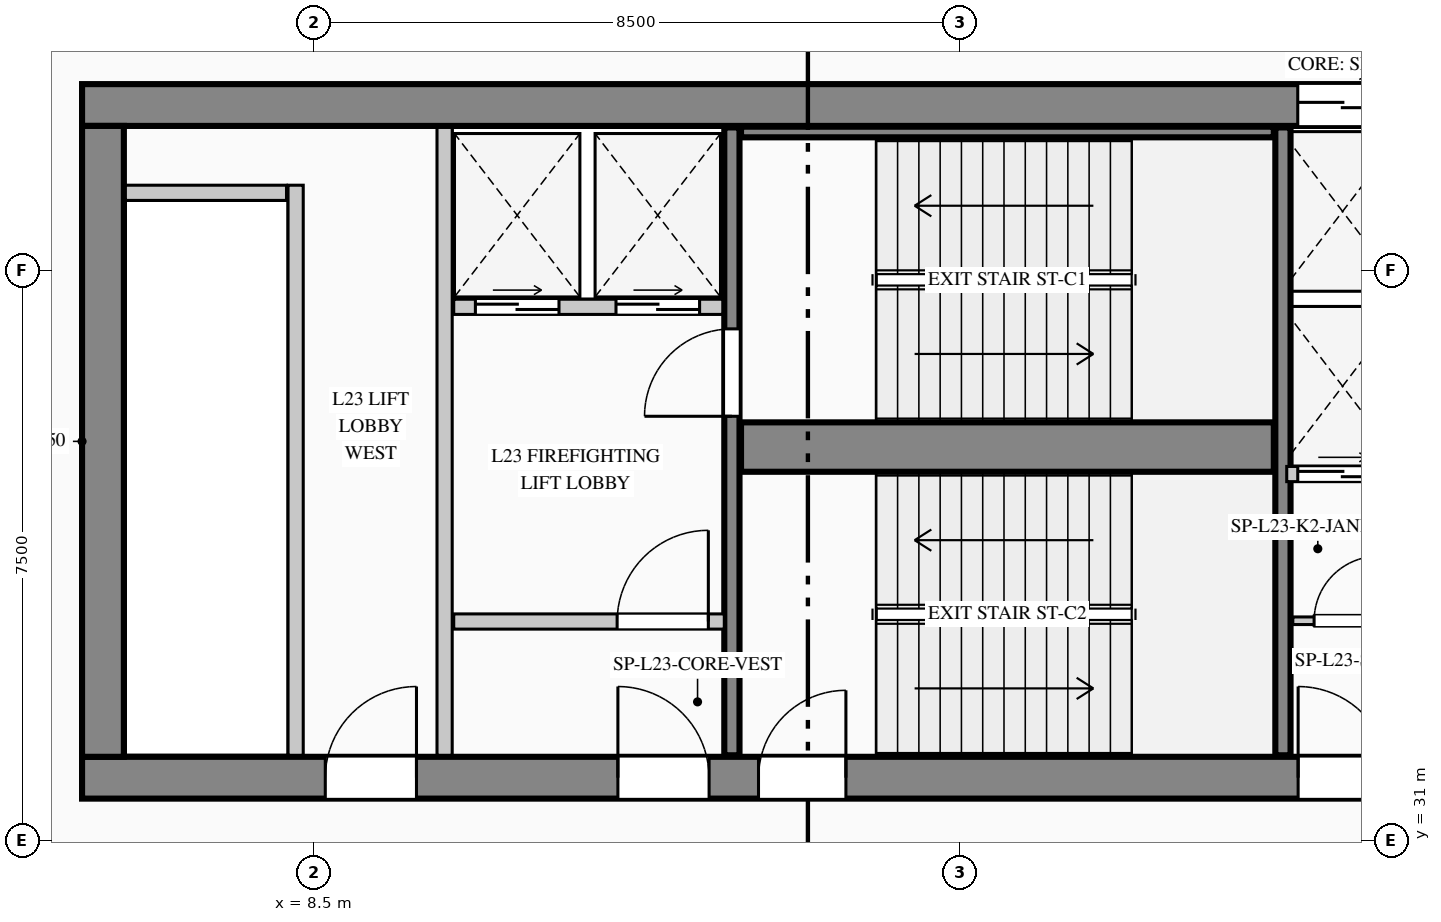
"""IFC4 building model, lengths in metres.
Left out: names, types, materials, properties, quantities, classifications, styles, units other than length and angle.
Written with IfcOpenShell. Run it as: python <this file> out.ifc"""

import sys

from ifc_helpers import new_model, si_unit, direction, frame, frame_2d, origin, place, context, subcontext, project, spatial, rectangle, extrude, element, fill, save


model = new_model("IFC4")
c1 = context("Model", 3, precision=1e-05, world=origin(), true_north=direction((0.0, 1.0)))
c2 = subcontext(c1, "Body", "Model", "MODEL_VIEW")
j1 = project(units=[si_unit("LENGTHUNIT", "METRE"), si_unit("PLANEANGLEUNIT", "RADIAN")], contexts=[c1])
p1 = place(None, origin())
s1 = spatial("IfcSite", under=j1, at=p1, CompositionType="ELEMENT")
p2 = place(p1, origin())
s2 = spatial("IfcBuilding", under=s1, at=p2, CompositionType="ELEMENT")
p3 = place(p2, frame((0.0, 0.0, 101.8)))
s3 = spatial("IfcBuildingStorey", under=s2, at=p3, CompositionType="ELEMENT", Elevation=101.8)
p4 = place(p3, frame((5.45, 40.675, 0.0), z_axis=(0.0, 0.0, 1.0), x_axis=(1.0, 0.0, 0.0)))
e1 = element("IfcWall", 1, at=p4, inside=s3, PredefinedType="SHEAR", context=c2, shape_type="SweptSolid", body=[
    extrude(rectangle(XDim=17.95, YDim=0.55, at=frame_2d((8.975, 0.0))), origin(), (0.0, 0.0, 1.0), 4.4),
])
p5 = place(p4, frame((15.995, 0.0, 0.0)))
e2 = element("IfcOpeningElement", 2, at=p5, cuts=e1, PredefinedType="OPENING", context=c2, shape_type="SweptSolid", body=[
    extrude(rectangle(XDim=1.18, YDim=2.25, at=frame_2d((0.59, 1.125))), frame((0.0, 0.285, 0.0), z_axis=(0.0, -1.0, 0.0), x_axis=(1.0, 0.0, 0.0)), (0.0, 0.0, 1.0), 0.57),
])
p6 = place(p3, frame((5.45, 31.825, 0.0), z_axis=(0.0, 0.0, 1.0), x_axis=(1.0, 0.0, 0.0)))
e3 = element("IfcWall", 3, at=p6, inside=s3, PredefinedType="SHEAR", context=c2, shape_type="SweptSolid", body=[
    extrude(rectangle(XDim=17.95, YDim=0.55, at=frame_2d((8.975, 0.0))), origin(), (0.0, 0.0, 1.0), 4.4),
])
p7 = place(p6, frame((3.2, 0.0, 0.0)))
e4 = element("IfcOpeningElement", 4, at=p7, cuts=e3, PredefinedType="OPENING", context=c2, shape_type="SweptSolid", body=[
    extrude(rectangle(XDim=1.2, YDim=2.2, at=frame_2d((0.6, 1.1))), frame((0.0, 0.285, 0.0), z_axis=(0.0, -1.0, 0.0), x_axis=(1.0, 0.0, 0.0)), (0.0, 0.0, 1.0), 0.57),
])
p8 = place(p6, frame((7.05, 0.0, 0.0)))
e5 = element("IfcOpeningElement", 5, at=p8, cuts=e3, PredefinedType="OPENING", context=c2, shape_type="SweptSolid", body=[
    extrude(rectangle(XDim=1.2, YDim=2.2, at=frame_2d((0.6, 1.1))), frame((0.0, 0.285, 0.0), z_axis=(0.0, -1.0, 0.0), x_axis=(1.0, 0.0, 0.0)), (0.0, 0.0, 1.0), 0.57),
])
p9 = place(p6, frame((8.9, 0.0, 0.0)))
e6 = element("IfcOpeningElement", 6, at=p9, cuts=e3, PredefinedType="OPENING", context=c2, shape_type="SweptSolid", body=[
    extrude(rectangle(XDim=1.15, YDim=2.2, at=frame_2d((0.575, 1.1))), frame((0.0, 0.285, 0.0), z_axis=(0.0, -1.0, 0.0), x_axis=(1.0, 0.0, 0.0)), (0.0, 0.0, 1.0), 0.57),
])
p10 = place(p6, frame((16.0, 0.0, 0.0)))
e7 = element("IfcOpeningElement", 7, at=p10, cuts=e3, PredefinedType="OPENING", context=c2, shape_type="SweptSolid", body=[
    extrude(rectangle(XDim=1.2, YDim=2.2, at=frame_2d((0.6, 1.1))), frame((0.0, 0.285, 0.0), z_axis=(0.0, -1.0, 0.0), x_axis=(1.0, 0.0, 0.0)), (0.0, 0.0, 1.0), 0.57),
])
p11 = place(p3, frame((5.725, 32.1, 0.0), z_axis=(0.0, 0.0, 1.0), x_axis=(0.0, 1.0, 0.0)))
e8 = element("IfcWall", 8, at=p11, inside=s3, PredefinedType="SHEAR", context=c2, shape_type="SweptSolid", body=[
    extrude(rectangle(XDim=8.3, YDim=0.55, at=frame_2d((4.15, 0.0))), origin(), (0.0, 0.0, 1.0), 4.4),
])
p12 = place(p3, frame((14.0, 32.12, 0.0), z_axis=(0.0, 0.0, 1.0), x_axis=(0.0, 1.0, 0.0)))
e9 = element("IfcWall", 9, at=p12, inside=s3, PredefinedType="SHEAR", context=c2, shape_type="SweptSolid", body=[
    extrude(rectangle(XDim=8.26, YDim=0.2, at=frame_2d((4.13, 0.0))), origin(), (0.0, 0.0, 1.0), 4.4),
])
p13 = place(p12, frame((4.46, 0.0, 0.0)))
e10 = element("IfcOpeningElement", 10, at=p13, cuts=e9, PredefinedType="OPENING", context=c2, shape_type="SweptSolid", body=[
    extrude(rectangle(XDim=1.15, YDim=2.2, at=frame_2d((0.575, 1.1))), frame((0.0, 0.11, 0.0), z_axis=(0.0, -1.0, 0.0), x_axis=(1.0, 0.0, 0.0)), (0.0, 0.0, 1.0), 0.22),
])
p14 = place(p3, frame((14.12, 36.175, 0.0), z_axis=(0.0, 0.0, 1.0), x_axis=(1.0, 0.0, 0.0)))
e11 = element("IfcWall", 11, at=p14, inside=s3, PredefinedType="SHEAR", context=c2, shape_type="SweptSolid", body=[
    extrude(rectangle(XDim=7.01, YDim=0.65, at=frame_2d((3.505, 0.0))), origin(), (0.0, 0.0, 1.0), 4.4),
])
p15 = place(p3, frame((21.25, 32.12, 0.0), z_axis=(0.0, 0.0, 1.0), x_axis=(0.0, 1.0, 0.0)))
e12 = element("IfcWall", 12, at=p15, inside=s3, PredefinedType="SHEAR", context=c2, shape_type="SweptSolid", body=[
    extrude(rectangle(XDim=8.26, YDim=0.2, at=frame_2d((4.13, 0.0))), origin(), (0.0, 0.0, 1.0), 4.4),
])
p16 = place(p3, frame((14.12, 40.32, 0.0), z_axis=(0.0, 0.0, 1.0), x_axis=(1.0, 0.0, 0.0)))
e13 = element("IfcWall", 13, at=p16, inside=s3, PredefinedType="SHEAR", context=c2, shape_type="SweptSolid", body=[
    extrude(rectangle(XDim=7.01, YDim=0.14, at=frame_2d((3.505, 0.0))), origin(), (0.0, 0.0, 1.0), 4.4),
])
p17 = place(p3, frame((8.523, 4.84, 0.0), z_axis=(0.0, 0.0, 1.0), x_axis=(-0.150394554312, 0.988626055712, 0.0)))
e14 = element("IfcWall", 14, at=p17, inside=s3, PredefinedType="STANDARD", context=c2, shape_type="SweptSolid", body=[
    extrude(rectangle(XDim=36.738, YDim=0.28, at=frame_2d((18.369, 0.0))), origin(), (0.0, 0.0, 1.0), 4.05),
])
p18 = place(p17, frame((22.612, 0.0, 0.9)))
e15 = element("IfcOpeningElement", 15, at=p18, cuts=e14, PredefinedType="OPENING", context=c2, shape_type="SweptSolid", body=[
    extrude(rectangle(XDim=1.8, YDim=2.1, at=frame_2d((0.9, 1.05))), frame((0.0, 0.15, 0.0), z_axis=(0.0, -1.0, 0.0), x_axis=(1.0, 0.0, 0.0)), (0.0, 0.0, 1.0), 0.3),
])
p19 = place(p3, frame((8.26, 32.12, 0.0), z_axis=(0.0, 0.0, 1.0), x_axis=(0.0, 1.0, 0.0)))
e16 = element("IfcWall", 16, at=p19, inside=s3, PredefinedType="PARTITIONING", context=c2, shape_type="SweptSolid", body=[
    extrude(rectangle(XDim=7.5, YDim=0.2, at=frame_2d((3.75, 0.0))), origin(), (0.0, 0.0, 1.0), 4.05),
])
p20 = place(p3, frame((6.02, 39.52, 0.0), z_axis=(0.0, 0.0, 1.0), x_axis=(1.0, 0.0, 0.0)))
e17 = element("IfcWall", 17, at=p20, inside=s3, PredefinedType="PARTITIONING", context=c2, shape_type="SweptSolid", body=[
    extrude(rectangle(XDim=2.12, YDim=0.2, at=frame_2d((1.06, 0.0))), origin(), (0.0, 0.0, 1.0), 4.05),
])
p21 = place(p3, frame((10.22, 32.12, 0.0), z_axis=(0.0, 0.0, 1.0), x_axis=(0.0, 1.0, 0.0)))
e18 = element("IfcWall", 18, at=p21, inside=s3, PredefinedType="PARTITIONING", context=c2, shape_type="SweptSolid", body=[
    extrude(rectangle(XDim=8.26, YDim=0.2, at=frame_2d((4.13, 0.0))), origin(), (0.0, 0.0, 1.0), 4.05),
])
p22 = place(p3, frame((10.34, 38.02, 0.0), z_axis=(0.0, 0.0, 1.0), x_axis=(1.0, 0.0, 0.0)))
e19 = element("IfcWall", 19, at=p22, inside=s3, PredefinedType="PARTITIONING", context=c2, shape_type="SweptSolid", body=[
    extrude(rectangle(XDim=3.54, YDim=0.2, at=frame_2d((1.77, 0.0))), origin(), (0.0, 0.0, 1.0), 4.05),
])
p23 = place(p22, frame((0.285, 0.0, 0.0)))
e20 = element("IfcOpeningElement", 20, at=p23, cuts=e19, PredefinedType="OPENING", context=c2, shape_type="SweptSolid", body=[
    extrude(rectangle(XDim=1.1, YDim=2.2, at=frame_2d((0.55, 1.1))), frame((0.0, 0.11, 0.0), z_axis=(0.0, -1.0, 0.0), x_axis=(1.0, 0.0, 0.0)), (0.0, 0.0, 1.0), 0.22),
])
p24 = place(p22, frame((2.135, 0.0, 0.0)))
e21 = element("IfcOpeningElement", 21, at=p24, cuts=e19, PredefinedType="OPENING", context=c2, shape_type="SweptSolid", body=[
    extrude(rectangle(XDim=1.1, YDim=2.2, at=frame_2d((0.55, 1.1))), frame((0.0, 0.11, 0.0), z_axis=(0.0, -1.0, 0.0), x_axis=(1.0, 0.0, 0.0)), (0.0, 0.0, 1.0), 0.22),
])
p25 = place(p3, frame((10.34, 33.88, 0.0), z_axis=(0.0, 0.0, 1.0), x_axis=(1.0, 0.0, 0.0)))
e22 = element("IfcWall", 22, at=p25, inside=s3, PredefinedType="PARTITIONING", context=c2, shape_type="SweptSolid", body=[
    extrude(rectangle(XDim=3.56, YDim=0.2, at=frame_2d((1.78, 0.0))), origin(), (0.0, 0.0, 1.0), 4.05),
])
p26 = place(p25, frame((2.15, 0.0, 0.0)))
e23 = element("IfcOpeningElement", 23, at=p26, cuts=e22, PredefinedType="OPENING", context=c2, shape_type="SweptSolid", body=[
    extrude(rectangle(XDim=1.2, YDim=2.2, at=frame_2d((0.6, 1.1))), frame((0.0, 0.11, 0.0), z_axis=(0.0, -1.0, 0.0), x_axis=(1.0, 0.0, 0.0)), (0.0, 0.0, 1.0), 0.22),
])
p27 = place(p3, frame((21.38, 33.89, 0.0), z_axis=(0.0, 0.0, 1.0), x_axis=(1.0, 0.0, 0.0)))
e24 = element("IfcWall", 24, at=p27, inside=s3, PredefinedType="PARTITIONING", context=c2, shape_type="SweptSolid", body=[
    extrude(rectangle(XDim=1.42, YDim=0.1, at=frame_2d((0.71, 0.0))), origin(), (0.0, 0.0, 1.0), 4.05),
])
p28 = place(p27, frame((0.28, 0.0, 0.0)))
e25 = element("IfcOpeningElement", 25, at=p28, cuts=e24, PredefinedType="OPENING", context=c2, shape_type="SweptSolid", body=[
    extrude(rectangle(XDim=0.85, YDim=2.1, at=frame_2d((0.425, 1.05))), frame((0.0, 0.06, 0.0), z_axis=(0.0, -1.0, 0.0), x_axis=(1.0, 0.0, 0.0)), (0.0, 0.0, 1.0), 0.12),
])
p29 = place(p3, frame((21.3, 35.82, 0.0), z_axis=(0.0, 0.0, 1.0), x_axis=(1.0, 0.0, 0.0)))
e26 = element("IfcWall", 26, at=p29, inside=s3, PredefinedType="PARTITIONING", context=c2, shape_type="SweptSolid", body=[
    extrude(rectangle(XDim=1.5, YDim=0.2, at=frame_2d((0.75, 0.0))), origin(), (0.0, 0.0, 1.0), 4.05),
])
p30 = place(p29, frame((0.145, 0.0, 0.0)))
e27 = element("IfcOpeningElement", 27, at=p30, cuts=e26, PredefinedType="OPENING", context=c2, shape_type="SweptSolid", body=[
    extrude(rectangle(XDim=1.18, YDim=2.25, at=frame_2d((0.59, 1.125))), frame((0.0, 0.11, 0.0), z_axis=(0.0, -1.0, 0.0), x_axis=(1.0, 0.0, 0.0)), (0.0, 0.0, 1.0), 0.22),
])
p31 = place(p7, origin())
e28 = element("IfcDoor", 28, at=p31, inside=s3, OperationType="SINGLE_SWING_RIGHT", PredefinedType="DOOR", context=c2, shape_type="SweptSolid", body=[
    extrude(rectangle(XDim=1.2, YDim=2.2, at=frame_2d((0.6, 1.1))), frame((0.0, 0.025, 0.0), z_axis=(0.0, -1.0, 0.0), x_axis=(1.0, 0.0, 0.0)), (0.0, 0.0, 1.0), 0.05),
])
fill(e4, e28)
p32 = place(p8, origin())
e29 = element("IfcDoor", 29, at=p32, inside=s3, OperationType="SINGLE_SWING_LEFT", PredefinedType="DOOR", context=c2, shape_type="SweptSolid", body=[
    extrude(rectangle(XDim=1.2, YDim=2.2, at=frame_2d((0.6, 1.1))), frame((0.0, 0.025, 0.0), z_axis=(0.0, -1.0, 0.0), x_axis=(1.0, 0.0, 0.0)), (0.0, 0.0, 1.0), 0.05),
])
fill(e5, e29)
p33 = place(p9, origin())
e30 = element("IfcDoor", 30, at=p33, inside=s3, OperationType="SINGLE_SWING_RIGHT", PredefinedType="DOOR", context=c2, shape_type="SweptSolid", body=[
    extrude(rectangle(XDim=1.15, YDim=2.2, at=frame_2d((0.575, 1.1))), frame((0.0, 0.025, 0.0), z_axis=(0.0, -1.0, 0.0), x_axis=(1.0, 0.0, 0.0)), (0.0, 0.0, 1.0), 0.05),
])
fill(e6, e30)
p34 = place(p10, origin())
e31 = element("IfcDoor", 31, at=p34, inside=s3, OperationType="SINGLE_SWING_LEFT", PredefinedType="DOOR", context=c2, shape_type="SweptSolid", body=[
    extrude(rectangle(XDim=1.2, YDim=2.2, at=frame_2d((0.6, 1.1))), frame((0.0, 0.025, 0.0), z_axis=(0.0, -1.0, 0.0), x_axis=(1.0, 0.0, 0.0)), (0.0, 0.0, 1.0), 0.05),
])
fill(e7, e31)
p35 = place(p26, origin())
e32 = element("IfcDoor", 32, at=p35, inside=s3, OperationType="SINGLE_SWING_RIGHT", PredefinedType="DOOR", context=c2, shape_type="SweptSolid", body=[
    extrude(rectangle(XDim=1.2, YDim=2.2, at=frame_2d((0.6, 1.1))), frame((0.0, 0.025, 0.0), z_axis=(0.0, -1.0, 0.0), x_axis=(1.0, 0.0, 0.0)), (0.0, 0.0, 1.0), 0.05),
])
fill(e23, e32)
p36 = place(p28, origin())
e33 = element("IfcDoor", 33, at=p36, inside=s3, OperationType="SINGLE_SWING_RIGHT", PredefinedType="DOOR", context=c2, shape_type="SweptSolid", body=[
    extrude(rectangle(XDim=0.85, YDim=2.1, at=frame_2d((0.425, 1.05))), frame((0.0, 0.025, 0.0), z_axis=(0.0, -1.0, 0.0), x_axis=(1.0, 0.0, 0.0)), (0.0, 0.0, 1.0), 0.05),
])
fill(e25, e33)
p37 = place(p13, origin())
e34 = element("IfcDoor", 34, at=p37, inside=s3, OperationType="SINGLE_SWING_LEFT", PredefinedType="DOOR", context=c2, shape_type="SweptSolid", body=[
    extrude(rectangle(XDim=1.15, YDim=2.2, at=frame_2d((0.575, 1.1))), frame((0.0, 0.025, 0.0), z_axis=(0.0, -1.0, 0.0), x_axis=(1.0, 0.0, 0.0)), (0.0, 0.0, 1.0), 0.05),
])
fill(e10, e34)
p38 = place(p23, origin())
e35 = element("IfcDoor", 35, at=p38, inside=s3, OperationType="DOUBLE_DOOR_SLIDING", PredefinedType="DOOR", context=c2, shape_type="SweptSolid", body=[
    extrude(rectangle(XDim=1.1, YDim=2.2, at=frame_2d((0.55, 1.1))), frame((0.0, 0.025, 0.0), z_axis=(0.0, -1.0, 0.0), x_axis=(1.0, 0.0, 0.0)), (0.0, 0.0, 1.0), 0.05),
])
fill(e20, e35)
p39 = place(p24, origin())
e36 = element("IfcDoor", 36, at=p39, inside=s3, OperationType="DOUBLE_DOOR_SLIDING", PredefinedType="DOOR", context=c2, shape_type="SweptSolid", body=[
    extrude(rectangle(XDim=1.1, YDim=2.2, at=frame_2d((0.55, 1.1))), frame((0.0, 0.025, 0.0), z_axis=(0.0, -1.0, 0.0), x_axis=(1.0, 0.0, 0.0)), (0.0, 0.0, 1.0), 0.05),
])
fill(e21, e36)
p40 = place(p5, origin())
e37 = element("IfcDoor", 37, at=p40, inside=s3, OperationType="DOUBLE_DOOR_SLIDING", PredefinedType="DOOR", context=c2, shape_type="SweptSolid", body=[
    extrude(rectangle(XDim=1.18, YDim=2.25, at=frame_2d((0.59, 1.125))), frame((0.0, 0.025, 0.0), z_axis=(0.0, -1.0, 0.0), x_axis=(1.0, 0.0, 0.0)), (0.0, 0.0, 1.0), 0.05),
])
fill(e2, e37)
p41 = place(p30, origin())
e38 = element("IfcDoor", 38, at=p41, inside=s3, OperationType="DOUBLE_DOOR_SLIDING", PredefinedType="DOOR", context=c2, shape_type="SweptSolid", body=[
    extrude(rectangle(XDim=1.18, YDim=2.25, at=frame_2d((0.59, 1.125))), frame((0.0, 0.025, 0.0), z_axis=(0.0, -1.0, 0.0), x_axis=(1.0, 0.0, 0.0)), (0.0, 0.0, 1.0), 0.05),
])
fill(e27, e38)
save(model, sys.argv[1])
